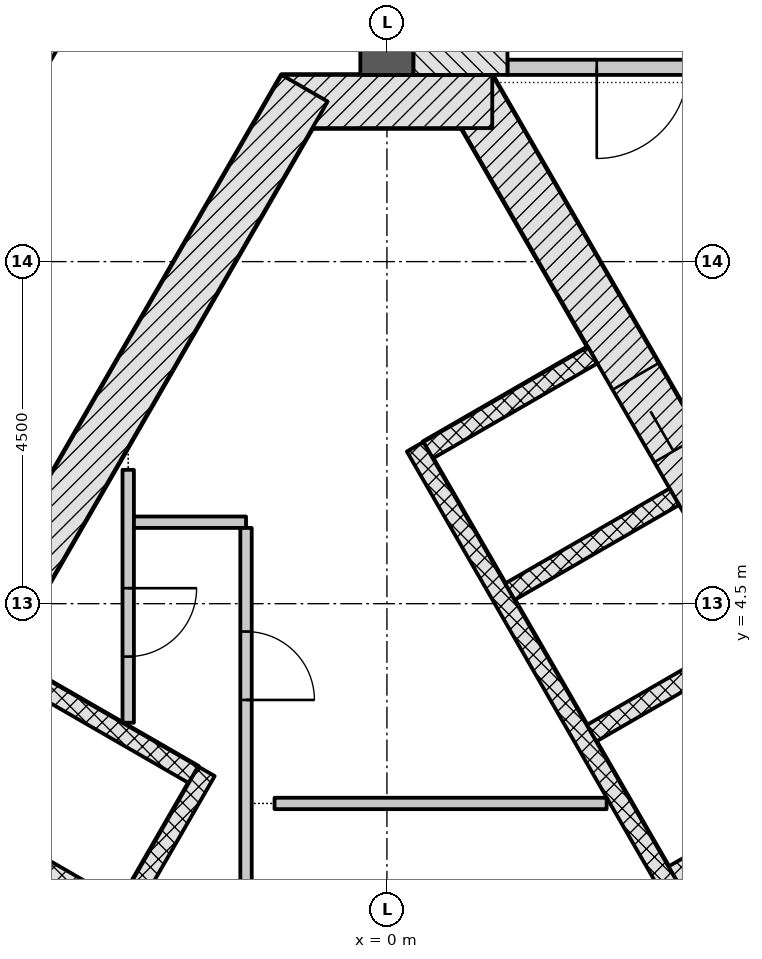
"""IFC4 building model, lengths in metres.
Left out: names, types, materials, properties, quantities, classifications, styles, units other than length and angle.
Written with IfcOpenShell. Run it as: python <this file> out.ifc"""

import sys

from ifc_helpers import new_model, si_unit, direction, frame, frame_2d, origin, place, context, subcontext, project, spatial, rectangle, extrude, element, fill, save


model = new_model("IFC4")
c1 = context("Model", 3, precision=1e-05, world=origin(), true_north=direction((0.0, 1.0)))
c2 = subcontext(c1, "Body", "Model", "MODEL_VIEW")
j1 = project(units=[si_unit("LENGTHUNIT", "METRE"), si_unit("PLANEANGLEUNIT", "RADIAN")], contexts=[c1])
p1 = place(None, origin())
s1 = spatial("IfcSite", under=j1, at=p1, CompositionType="ELEMENT")
p2 = place(p1, origin())
s2 = spatial("IfcBuilding", under=s1, at=p2, CompositionType="ELEMENT")
p3 = place(p2, frame((0.0, 0.0, 192.3)))
s3 = spatial("IfcBuildingStorey", under=s2, at=p3, CompositionType="ELEMENT", Elevation=192.3)
p4 = place(p3, frame((10.311, -4.703, -0.2), z_axis=(0.0, 0.0, 1.0), x_axis=(-0.500001446645, 0.866024568562, 0.0)))
e1 = element("IfcWall", 1, at=p4, inside=s3, PredefinedType="SHEAR", context=c2, shape_type="SweptSolid", body=[
    extrude(rectangle(XDim=18.458, YDim=0.7, at=frame_2d((9.229, 0.0))), origin(), (0.0, 0.0, 1.0), 3.6),
])
p5 = place(p4, frame((4.379, 0.0, 0.2)))
e2 = element("IfcOpeningElement", 2, at=p5, cuts=e1, PredefinedType="OPENING", context=c2, shape_type="SweptSolid", body=[
    extrude(rectangle(XDim=1.1, YDim=2.1, at=frame_2d((0.55, 1.05))), frame((0.0, 0.36, 0.0), z_axis=(0.0, -1.0, 0.0), x_axis=(1.0, 0.0, 0.0)), (0.0, 0.0, 1.0), 0.72),
])
p6 = place(p4, frame((6.529, 0.0, 0.2)))
e3 = element("IfcOpeningElement", 3, at=p6, cuts=e1, PredefinedType="OPENING", context=c2, shape_type="SweptSolid", body=[
    extrude(rectangle(XDim=1.1, YDim=2.1, at=frame_2d((0.55, 1.05))), frame((0.0, 0.36, 0.0), z_axis=(0.0, -1.0, 0.0), x_axis=(1.0, 0.0, 0.0)), (0.0, 0.0, 1.0), 0.72),
])
p7 = place(p4, frame((8.679, 0.0, 0.2)))
e4 = element("IfcOpeningElement", 4, at=p7, cuts=e1, PredefinedType="OPENING", context=c2, shape_type="SweptSolid", body=[
    extrude(rectangle(XDim=1.1, YDim=2.1, at=frame_2d((0.55, 1.05))), frame((0.0, 0.36, 0.0), z_axis=(0.0, -1.0, 0.0), x_axis=(1.0, 0.0, 0.0)), (0.0, 0.0, 1.0), 0.72),
])
p8 = place(p4, frame((10.829, 0.0, 0.2)))
e5 = element("IfcOpeningElement", 5, at=p8, cuts=e1, PredefinedType="OPENING", context=c2, shape_type="SweptSolid", body=[
    extrude(rectangle(XDim=1.1, YDim=2.1, at=frame_2d((0.55, 1.05))), frame((0.0, 0.36, 0.0), z_axis=(0.0, -1.0, 0.0), x_axis=(1.0, 0.0, 0.0)), (0.0, 0.0, 1.0), 0.72),
])
p9 = place(p4, frame((12.979, 0.0, 0.2)))
e6 = element("IfcOpeningElement", 6, at=p9, cuts=e1, PredefinedType="OPENING", context=c2, shape_type="SweptSolid", body=[
    extrude(rectangle(XDim=1.1, YDim=2.1, at=frame_2d((0.55, 1.05))), frame((0.0, 0.36, 0.0), z_axis=(0.0, -1.0, 0.0), x_axis=(1.0, 0.0, 0.0)), (0.0, 0.0, 1.0), 0.72),
])
p10 = place(p3, frame((1.386, 11.106, -0.2), z_axis=(0.0, 0.0, 1.0), x_axis=(-1.0, 0.0, 0.0)))
e7 = element("IfcWall", 7, at=p10, inside=s3, PredefinedType="SHEAR", context=c2, shape_type="SweptSolid", body=[
    extrude(rectangle(XDim=2.771, YDim=0.7, at=frame_2d((1.386, 0.0))), origin(), (0.0, 0.0, 1.0), 3.6),
])
p11 = place(p3, frame((-1.083, 11.281, -0.2), z_axis=(0.0, 0.0, 1.0), x_axis=(-0.500001446645, -0.866024568562, 0.0)))
e8 = element("IfcWall", 8, at=p11, inside=s3, PredefinedType="SHEAR", context=c2, shape_type="SweptSolid", body=[
    extrude(rectangle(XDim=18.458, YDim=0.7, at=frame_2d((9.229, 0.0))), origin(), (0.0, 0.0, 1.0), 3.6),
])
p12 = place(p11, frame((8.979, 0.0, 0.2)))
e9 = element("IfcOpeningElement", 9, at=p12, cuts=e8, PredefinedType="OPENING", context=c2, shape_type="SweptSolid", body=[
    extrude(rectangle(XDim=1.2, YDim=2.1, at=frame_2d((0.6, 1.05))), frame((0.0, 0.36, 0.0), z_axis=(0.0, -1.0, 0.0), x_axis=(1.0, 0.0, 0.0)), (0.0, 0.0, 1.0), 0.72),
])
p13 = place(p11, frame((11.029, 0.0, 0.2)))
e10 = element("IfcOpeningElement", 10, at=p13, cuts=e8, PredefinedType="OPENING", context=c2, shape_type="SweptSolid", body=[
    extrude(rectangle(XDim=1.2, YDim=2.1, at=frame_2d((0.6, 1.05))), frame((0.0, 0.36, 0.0), z_axis=(0.0, -1.0, 0.0), x_axis=(1.0, 0.0, 0.0)), (0.0, 0.0, 1.0), 0.72),
])
p14 = place(p3, frame((0.0, 11.456, -0.2), z_axis=(0.0, 0.0, 1.0), x_axis=(0.0, 1.0, 0.0)))
e11 = element("IfcWall", 11, at=p14, inside=s3, PredefinedType="SHEAR", context=c2, shape_type="SweptSolid", body=[
    extrude(rectangle(XDim=9.145, YDim=0.7, at=frame_2d((4.572, 0.0))), origin(), (0.0, 0.0, 1.0), 3.6),
])
p15 = place(p3, frame((5.931, 2.183, -0.2), z_axis=(0.0, 0.0, 1.0), x_axis=(-0.866047370643, -0.499961950354, 0.0)))
e12 = element("IfcWall", 12, at=p15, inside=s3, PredefinedType="PARTITIONING", context=c2, shape_type="SweptSolid", body=[
    extrude(rectangle(XDim=2.5, YDim=0.25, at=frame_2d((1.25, 0.0))), origin(), (0.0, 0.0, 1.0), 3.6),
])
for number, where, z_axis, x_axis in (
    (13, (4.856, 4.045, -0.2), (0.0, 0.0, 1.0), (-0.866, -0.5, 0.0)),
    (14, (3.781, 5.907, -0.2), (0.0, 0.0, 1.0), (-0.866, -0.5, 0.0)),
    (15, (2.706, 7.769, -0.2), (0.0, 0.0, 1.0), (-0.866, -0.5, 0.0)),
):
    element("IfcWall", number, at=place(p3, frame(where, z_axis=z_axis, x_axis=x_axis)), inside=s3, PredefinedType="PARTITIONING", context=c2, shape_type="SweptSolid", body=[
        extrude(rectangle(XDim=2.5, YDim=0.25, at=frame_2d((1.25, 0.0))), origin(), (0.0, 0.0, 1.0), 3.6),
    ])
p16 = place(p3, frame((5.87, -2.961, 0.0), z_axis=(0.0, 0.0, 1.0), x_axis=(-0.50000615651, 0.866021849293, 0.0)))
e16 = element("IfcWall", 16, at=p16, inside=s3, PredefinedType="PARTITIONING", context=c2, shape_type="SweptSolid", body=[
    extrude(rectangle(XDim=11.0, YDim=0.25, at=frame_2d((5.5, 0.0))), origin(), (0.0, 0.0, 1.0), 3.4),
])
for number, where, z_axis, x_axis in (
    (17, (-5.056, 3.699, -0.2), (0.0, 0.0, 1.0), (0.866, -0.5, 0.0)),
    (18, (-6.081, 1.923, -0.2), (0.0, 0.0, 1.0), (0.866, -0.5, 0.0)),
):
    element("IfcWall", number, at=place(p3, frame(where, z_axis=z_axis, x_axis=x_axis)), inside=s3, PredefinedType="PARTITIONING", context=c2, shape_type="SweptSolid", body=[
        extrude(rectangle(XDim=2.9, YDim=0.25, at=frame_2d((1.45, 0.0))), origin(), (0.0, 0.0, 1.0), 3.6),
    ])
p17 = place(p3, frame((-2.374, 2.294, 0.0), z_axis=(0.0, 0.0, 1.0), x_axis=(-0.500003174267, -0.866023571113, 0.0)))
e19 = element("IfcWall", 19, at=p17, inside=s3, PredefinedType="PARTITIONING", context=c2, shape_type="SweptSolid", body=[
    extrude(rectangle(XDim=6.7, YDim=0.25, at=frame_2d((3.35, 0.0))), origin(), (0.0, 0.0, 1.0), 3.4),
])
p18 = place(p3, frame((-3.404, 6.261, 0.0), z_axis=(0.0, 0.0, 1.0), x_axis=(0.0, -1.0, 0.0)))
e20 = element("IfcWall", 20, at=p18, inside=s3, PredefinedType="PARTITIONING", context=c2, shape_type="SweptSolid", body=[
    extrude(rectangle(XDim=3.327, YDim=0.15, at=frame_2d((1.664, 0.0))), origin(), (0.0, 0.0, 1.0), 3.4),
])
p19 = place(p18, frame((1.557, 0.0, 0.0)))
e21 = element("IfcOpeningElement", 21, at=p19, cuts=e20, PredefinedType="OPENING", context=c2, shape_type="SweptSolid", body=[
    extrude(rectangle(XDim=0.9, YDim=2.1, at=frame_2d((0.45, 1.05))), frame((0.0, 0.085, 0.0), z_axis=(0.0, -1.0, 0.0), x_axis=(1.0, 0.0, 0.0)), (0.0, 0.0, 1.0), 0.17),
])
p20 = place(p3, frame((-3.329, 5.572, 0.0), z_axis=(0.0, 0.0, 1.0), x_axis=(1.0, 0.0, 0.0)))
e22 = element("IfcWall", 22, at=p20, inside=s3, PredefinedType="PARTITIONING", context=c2, shape_type="SweptSolid", body=[
    extrude(rectangle(XDim=1.475, YDim=0.15, at=frame_2d((0.737, 0.0))), origin(), (0.0, 0.0, 1.0), 3.4),
])
p21 = place(p3, frame((-1.854, 5.497, 0.0), z_axis=(0.0, 0.0, 1.0), x_axis=(0.0, -1.0, 0.0)))
e23 = element("IfcWall", 23, at=p21, inside=s3, PredefinedType="PARTITIONING", context=c2, shape_type="SweptSolid", body=[
    extrude(rectangle(XDim=11.725, YDim=0.15, at=frame_2d((5.863, 0.0))), origin(), (0.0, 0.0, 1.0), 3.4),
])
p22 = place(p21, frame((5.775, 0.0, 0.0)))
e24 = element("IfcOpeningElement", 24, at=p22, cuts=e23, PredefinedType="OPENING", context=c2, shape_type="SweptSolid", body=[
    extrude(rectangle(XDim=0.9, YDim=2.1, at=frame_2d((0.45, 1.05))), frame((0.0, 0.085, 0.0), z_axis=(0.0, -1.0, 0.0), x_axis=(1.0, 0.0, 0.0)), (0.0, 0.0, 1.0), 0.17),
])
p23 = place(p21, frame((1.364, 0.0, 0.0)))
e25 = element("IfcOpeningElement", 25, at=p23, cuts=e23, PredefinedType="OPENING", context=c2, shape_type="SweptSolid", body=[
    extrude(rectangle(XDim=0.9, YDim=2.1, at=frame_2d((0.45, 1.05))), frame((0.0, 0.085, 0.0), z_axis=(0.0, -1.0, 0.0), x_axis=(1.0, 0.0, 0.0)), (0.0, 0.0, 1.0), 0.17),
])
p24 = place(p3, frame((-1.479, 1.872, 0.0), z_axis=(0.0, 0.0, 1.0), x_axis=(1.0, 0.0, 0.0)))
e26 = element("IfcWall", 26, at=p24, inside=s3, PredefinedType="PARTITIONING", context=c2, shape_type="SweptSolid", body=[
    extrude(rectangle(XDim=4.369, YDim=0.15, at=frame_2d((2.185, 0.0))), origin(), (0.0, 0.0, 1.0), 3.4),
])
p25 = place(p3, frame((5.135, 11.556, -0.2), z_axis=(0.0, 0.0, 1.0), x_axis=(-1.0, 0.0, 0.0)))
e27 = element("IfcWall", 27, at=p25, inside=s3, PredefinedType="SHEAR", context=c2, shape_type="SweptSolid", body=[
    extrude(rectangle(XDim=3.55, YDim=0.2, at=frame_2d((1.775, 0.0))), origin(), (0.0, 0.0, 1.0), 3.6),
])
p26 = place(p25, frame((1.175, 0.0, 0.2)))
e28 = element("IfcOpeningElement", 28, at=p26, cuts=e27, PredefinedType="OPENING", context=c2, shape_type="SweptSolid", body=[
    extrude(rectangle(XDim=1.2, YDim=2.1, at=frame_2d((0.6, 1.05))), frame((0.0, 0.11, 0.0), z_axis=(0.0, -1.0, 0.0), x_axis=(1.0, 0.0, 0.0)), (0.0, 0.0, 1.0), 0.22),
])
p27 = place(p3, frame((0.968, 11.456, -0.2), z_axis=(0.0, 0.0, 1.0), x_axis=(0.0, 1.0, 0.0)))
e29 = element("IfcWall", 29, at=p27, inside=s3, PredefinedType="SHEAR", context=c2, shape_type="SweptSolid", body=[
    extrude(rectangle(XDim=7.2, YDim=1.236, at=frame_2d((3.6, 0.0))), origin(), (0.0, 0.0, 1.0), 3.6),
])
p28 = place(p3, frame((-0.35, 18.85, 0.0), z_axis=(0.0, 0.0, 1.0), x_axis=(-0.500000553364, -0.866025084299, 0.0)))
e30 = element("IfcWall", 30, at=p28, inside=s3, PredefinedType="PARTITIONING", context=c2, shape_type="SweptSolid", body=[
    extrude(rectangle(XDim=11.981, YDim=0.15, at=frame_2d((5.991, 0.0))), origin(), (0.0, 0.0, 1.0), 2.852),
])
p29 = place(p9, origin())
e31 = element("IfcDoor", 31, at=p29, inside=s3, OperationType="DOUBLE_DOOR_SLIDING", PredefinedType="DOOR", context=c2, shape_type="SweptSolid", body=[
    extrude(rectangle(XDim=1.1, YDim=2.1, at=frame_2d((0.55, 1.05))), frame((0.0, 0.025, 0.0), z_axis=(0.0, -1.0, 0.0), x_axis=(1.0, 0.0, 0.0)), (0.0, 0.0, 1.0), 0.05),
])
fill(e6, e31)
p30 = place(p19, origin())
e32 = element("IfcDoor", 32, at=p30, inside=s3, OperationType="SINGLE_SWING_LEFT", PredefinedType="DOOR", context=c2, shape_type="SweptSolid", body=[
    extrude(rectangle(XDim=0.9, YDim=2.1, at=frame_2d((0.45, 1.05))), frame((0.0, 0.025, 0.0), z_axis=(0.0, -1.0, 0.0), x_axis=(1.0, 0.0, 0.0)), (0.0, 0.0, 1.0), 0.05),
])
fill(e21, e32)
p31 = place(p23, origin())
e33 = element("IfcDoor", 33, at=p31, inside=s3, OperationType="SINGLE_SWING_RIGHT", PredefinedType="DOOR", context=c2, shape_type="SweptSolid", body=[
    extrude(rectangle(XDim=0.9, YDim=2.1, at=frame_2d((0.45, 1.05))), frame((0.0, 0.025, 0.0), z_axis=(0.0, -1.0, 0.0), x_axis=(1.0, 0.0, 0.0)), (0.0, 0.0, 1.0), 0.05),
])
fill(e25, e33)
p32 = place(p26, origin())
e34 = element("IfcDoor", 34, at=p32, inside=s3, OperationType="SINGLE_SWING_RIGHT", PredefinedType="DOOR", context=c2, shape_type="SweptSolid", body=[
    extrude(rectangle(XDim=1.2, YDim=2.1, at=frame_2d((0.6, 1.05))), frame((0.0, 0.025, 0.0), z_axis=(0.0, -1.0, 0.0), x_axis=(1.0, 0.0, 0.0)), (0.0, 0.0, 1.0), 0.05),
])
fill(e28, e34)
save(model, sys.argv[1])
